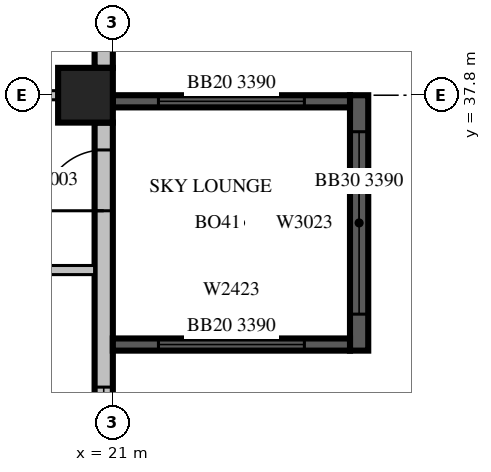
"""IFC4 building model, lengths in metres.
Left out: names, types, materials, properties, quantities, classifications, styles, units other than length and angle.
Written with IfcOpenShell. Run it as: python <this file> out.ifc"""

import sys

from ifc_helpers import new_model, si_unit, direction, frame, frame_2d, origin, origin_2d, place, context, subcontext, project, spatial, rectangle, extrude, source, transform, mapped, element, fill, save


model = new_model("IFC4")
c1 = context("Model", 3, precision=1e-05, world=origin(), true_north=direction((0.0, 1.0)))
c2 = subcontext(c1, "Body", "Model", "MODEL_VIEW")
j1 = project(units=[si_unit("LENGTHUNIT", "METRE"), si_unit("PLANEANGLEUNIT", "RADIAN")], contexts=[c1])
p1 = place(None, origin())
s1 = spatial("IfcSite", under=j1, at=p1, CompositionType="ELEMENT")
p2 = place(p1, origin())
s2 = spatial("IfcBuilding", under=s1, at=p2, CompositionType="ELEMENT")
p3 = place(p2, frame((0.0, 0.0, 208.2)))
s3 = spatial("IfcBuildingStorey", under=s2, at=p3, CompositionType="ELEMENT", Elevation=208.2)
m1 = source(origin(), c2, "Body", "SweptSolid", [
    extrude(rectangle(XDim=0.9, YDim=0.9, at=origin_2d()), origin(), (0.0, 0.0, 1.0), 3.8),
])
p4 = place(p3, frame((20.55, 37.8, 0.0), z_axis=(0.0, 0.0, 1.0), x_axis=(1.0, 0.0, 0.0)))
e1 = element("IfcColumn", 1, at=p4, inside=s3, PredefinedType="COLUMN", context=c2, shape_type="MappedRepresentation", body=[
    mapped(m1, transform((0.0, 0.0, 0.0), scale=1.0)),
])
m2 = source(origin(), c2, "Body", "SweptSolid", [
    extrude(rectangle(XDim=7.5, YDim=0.3, at=frame_2d((3.75, 0.0))), origin(), (0.0, 0.0, 1.0), 3.4),
])
p5 = place(p3, frame((20.85, 29.85, 0.0), z_axis=(0.0, 0.0, 1.0), x_axis=(0.0, 1.0, 0.0)))
e2 = element("IfcWall", 2, at=p5, inside=s3, PredefinedType="STANDARD", context=c2, shape_type="MappedRepresentation", body=[
    mapped(m2, transform((0.0, 0.0, 0.0), scale=1.0)),
])
m3 = source(origin(), c2, "Body", "SweptSolid", [
    extrude(rectangle(XDim=3.0, YDim=2.3, at=frame_2d((1.5, 1.15))), frame((0.0, 0.16, 0.0), z_axis=(0.0, -1.0, 0.0), x_axis=(1.0, 0.0, 0.0)), (0.0, 0.0, 1.0), 0.32),
])
p6 = place(p5, frame((0.15, 0.0, 0.6)))
e3 = element("IfcOpeningElement", 3, at=p6, cuts=e2, PredefinedType="OPENING", context=c2, shape_type="MappedRepresentation", body=[
    mapped(m3, transform((0.0, 0.0, 0.0), scale=1.0)),
])
m4 = source(origin(), c2, "Body", "SweptSolid", [
    extrude(rectangle(XDim=1.0, YDim=2.1, at=frame_2d((0.5, 1.05))), frame((0.0, 0.16, 0.0), z_axis=(0.0, -1.0, 0.0), x_axis=(1.0, 0.0, 0.0)), (0.0, 0.0, 1.0), 0.32),
])
p7 = place(p5, frame((6.05, 0.0, 0.0)))
e4 = element("IfcOpeningElement", 4, at=p7, cuts=e2, PredefinedType="OPENING", context=c2, shape_type="MappedRepresentation", body=[
    mapped(m4, transform((0.0, 0.0, 0.0), scale=1.0)),
])
m5 = source(origin(), c2, "Body", "SweptSolid", [
    extrude(rectangle(XDim=3.75, YDim=0.3, at=frame_2d((1.875, 0.0))), origin(), (0.0, 0.0, 1.0), 3.4),
])
p8 = place(p3, frame((20.85, 38.25, 0.0), z_axis=(0.0, 0.0, 1.0), x_axis=(0.0, 1.0, 0.0)))
e5 = element("IfcWall", 5, at=p8, inside=s3, PredefinedType="STANDARD", context=c2, shape_type="MappedRepresentation", body=[
    mapped(m5, transform((0.0, 0.0, 0.0), scale=1.0)),
])
m6 = source(origin(), c2, "Body", "SweptSolid", [
    extrude(rectangle(XDim=1.2, YDim=2.3, at=frame_2d((0.6, 1.15))), frame((0.0, 0.16, 0.0), z_axis=(0.0, -1.0, 0.0), x_axis=(1.0, 0.0, 0.0)), (0.0, 0.0, 1.0), 0.32),
])
p9 = place(p8, frame((0.557, 0.0, 0.6)))
e6 = element("IfcOpeningElement", 6, at=p9, cuts=e5, PredefinedType="OPENING", context=c2, shape_type="MappedRepresentation", body=[
    mapped(m6, transform((0.0, 0.0, 0.0), scale=1.0)),
])
m7 = source(origin(), c2, "Body", "SweptSolid", [
    extrude(rectangle(XDim=4.2, YDim=0.3, at=frame_2d((2.1, 0.0))), origin(), (0.0, 0.0, 1.0), 3.39),
])
p10 = place(p3, frame((25.05, 33.6, 0.0), z_axis=(0.0, 0.0, 1.0), x_axis=(0.0, 1.0, 0.0)))
e7 = element("IfcWall", 7, at=p10, inside=s3, PredefinedType="SOLIDWALL", context=c2, shape_type="MappedRepresentation", body=[
    mapped(m7, transform((0.0, 0.0, 0.0), scale=1.0)),
])
p11 = place(p10, frame((0.6, 0.0, 0.6)))
e8 = element("IfcOpeningElement", 8, at=p11, cuts=e7, PredefinedType="OPENING", context=c2, shape_type="MappedRepresentation", body=[
    mapped(m3, transform((0.0, 0.0, 0.0), scale=1.0)),
])
m8 = source(origin(), c2, "Body", "SweptSolid", [
    extrude(rectangle(XDim=3.9, YDim=0.2, at=frame_2d((1.95, 0.0))), origin(), (0.0, 0.0, 1.0), 3.39),
])
p12 = place(p3, frame((21.0, 33.7, 0.0), z_axis=(0.0, 0.0, 1.0), x_axis=(1.0, 0.0, 0.0)))
e9 = element("IfcWall", 9, at=p12, inside=s3, PredefinedType="SOLIDWALL", context=c2, shape_type="MappedRepresentation", body=[
    mapped(m8, transform((0.0, 0.0, 0.0), scale=1.0)),
])
m9 = source(origin(), c2, "Body", "SweptSolid", [
    extrude(rectangle(XDim=2.4, YDim=2.3, at=frame_2d((1.2, 1.15))), frame((0.0, 0.11, 0.0), z_axis=(0.0, -1.0, 0.0), x_axis=(1.0, 0.0, 0.0)), (0.0, 0.0, 1.0), 0.22),
])
p13 = place(p12, frame((0.75, 0.0, 0.6)))
e10 = element("IfcOpeningElement", 10, at=p13, cuts=e9, PredefinedType="OPENING", context=c2, shape_type="MappedRepresentation", body=[
    mapped(m9, transform((0.0, 0.0, 0.0), scale=1.0)),
])
p14 = place(p3, frame((21.0, 37.7, 0.0), z_axis=(0.0, 0.0, 1.0), x_axis=(1.0, 0.0, 0.0)))
e11 = element("IfcWall", 11, at=p14, inside=s3, PredefinedType="SOLIDWALL", context=c2, shape_type="MappedRepresentation", body=[
    mapped(m8, transform((0.0, 0.0, 0.0), scale=1.0)),
])
p15 = place(p14, frame((0.75, 0.0, 0.6)))
e12 = element("IfcOpeningElement", 12, at=p15, cuts=e11, PredefinedType="OPENING", context=c2, shape_type="MappedRepresentation", body=[
    mapped(m9, transform((0.0, 0.0, 0.0), scale=1.0)),
])
m10 = source(origin(), c2, "Body", "SweptSolid", [
    extrude(rectangle(XDim=3.6, YDim=0.15, at=frame_2d((1.8, 0.0))), origin(), (0.0, 0.0, 1.0), 3.4),
])
p16 = place(p3, frame((17.1, 34.925, 0.0), z_axis=(0.0, 0.0, 1.0), x_axis=(1.0, 0.0, 0.0)))
e13 = element("IfcWall", 13, at=p16, inside=s3, PredefinedType="PARTITIONING", context=c2, shape_type="MappedRepresentation", body=[
    mapped(m10, transform((0.0, 0.0, 0.0), scale=1.0)),
])
m11 = source(origin(), c2, "Body", "SweptSolid", [
    extrude(rectangle(XDim=0.9, YDim=2.1, at=frame_2d((0.45, 1.05))), frame((0.0, 0.085, 0.0), z_axis=(0.0, -1.0, 0.0), x_axis=(1.0, 0.0, 0.0)), (0.0, 0.0, 1.0), 0.17),
])
p17 = place(p16, frame((1.35, 0.0, 0.0)))
e14 = element("IfcOpeningElement", 14, at=p17, cuts=e13, PredefinedType="OPENING", context=c2, shape_type="MappedRepresentation", body=[
    mapped(m11, transform((0.0, 0.0, 0.0), scale=1.0)),
])
m12 = source(origin(), c2, "Body", "SweptSolid", [
    extrude(rectangle(XDim=3.001, YDim=0.15, at=frame_2d((1.5, 0.0))), origin(), (0.0, 0.0, 1.0), 3.4),
])
p18 = place(p3, frame((20.101, 37.8, 0.0), z_axis=(0.0, 0.0, 1.0), x_axis=(-1.0, 0.0, 0.0)))
e15 = element("IfcWall", 15, at=p18, inside=s3, PredefinedType="PARTITIONING", context=c2, shape_type="MappedRepresentation", body=[
    mapped(m12, transform((0.0, 0.0, 0.0), scale=1.0)),
])
m13 = source(origin(), c2, "Body", "SweptSolid", [
    extrude(rectangle(XDim=3.0, YDim=2.3, at=frame_2d((1.5, 1.15))), frame((0.0, 0.03, 0.0), z_axis=(0.0, -1.0, 0.0), x_axis=(1.0, 0.0, 0.0)), (0.0, 0.0, 1.0), 0.06),
])
p19 = place(p6, origin())
e16 = element("IfcWindow", 16, at=p19, inside=s3, PartitioningType="SINGLE_PANEL", PredefinedType="WINDOW", context=c2, shape_type="MappedRepresentation", body=[
    mapped(m13, transform((0.0, 0.0, 0.0), scale=1.0)),
])
fill(e3, e16)
p20 = place(p11, origin())
e17 = element("IfcWindow", 17, at=p20, inside=s3, PartitioningType="SINGLE_PANEL", PredefinedType="WINDOW", context=c2, shape_type="MappedRepresentation", body=[
    mapped(m13, transform((0.0, 0.0, 0.0), scale=1.0)),
])
fill(e8, e17)
m14 = source(origin(), c2, "Body", "SweptSolid", [
    extrude(rectangle(XDim=2.4, YDim=2.3, at=frame_2d((1.2, 1.15))), frame((0.0, 0.03, 0.0), z_axis=(0.0, -1.0, 0.0), x_axis=(1.0, 0.0, 0.0)), (0.0, 0.0, 1.0), 0.06),
])
p21 = place(p13, origin())
e18 = element("IfcWindow", 18, at=p21, inside=s3, PartitioningType="SINGLE_PANEL", PredefinedType="WINDOW", context=c2, shape_type="MappedRepresentation", body=[
    mapped(m14, transform((0.0, 0.0, 0.0), scale=1.0)),
])
fill(e10, e18)
p22 = place(p15, origin())
e19 = element("IfcWindow", 19, at=p22, inside=s3, PartitioningType="SINGLE_PANEL", PredefinedType="WINDOW", context=c2, shape_type="MappedRepresentation", body=[
    mapped(m14, transform((0.0, 0.0, 0.0), scale=1.0)),
])
fill(e12, e19)
m15 = source(origin(), c2, "Body", "SweptSolid", [
    extrude(rectangle(XDim=1.0, YDim=2.1, at=frame_2d((0.5, 1.05))), frame((0.0, 0.025, 0.0), z_axis=(0.0, -1.0, 0.0), x_axis=(1.0, 0.0, 0.0)), (0.0, 0.0, 1.0), 0.05),
])
p23 = place(p7, origin())
e20 = element("IfcDoor", 20, at=p23, inside=s3, OperationType="SINGLE_SWING_LEFT", PredefinedType="DOOR", context=c2, shape_type="MappedRepresentation", body=[
    mapped(m15, transform((0.0, 0.0, 0.0), scale=1.0)),
])
fill(e4, e20)
save(model, sys.argv[1])
